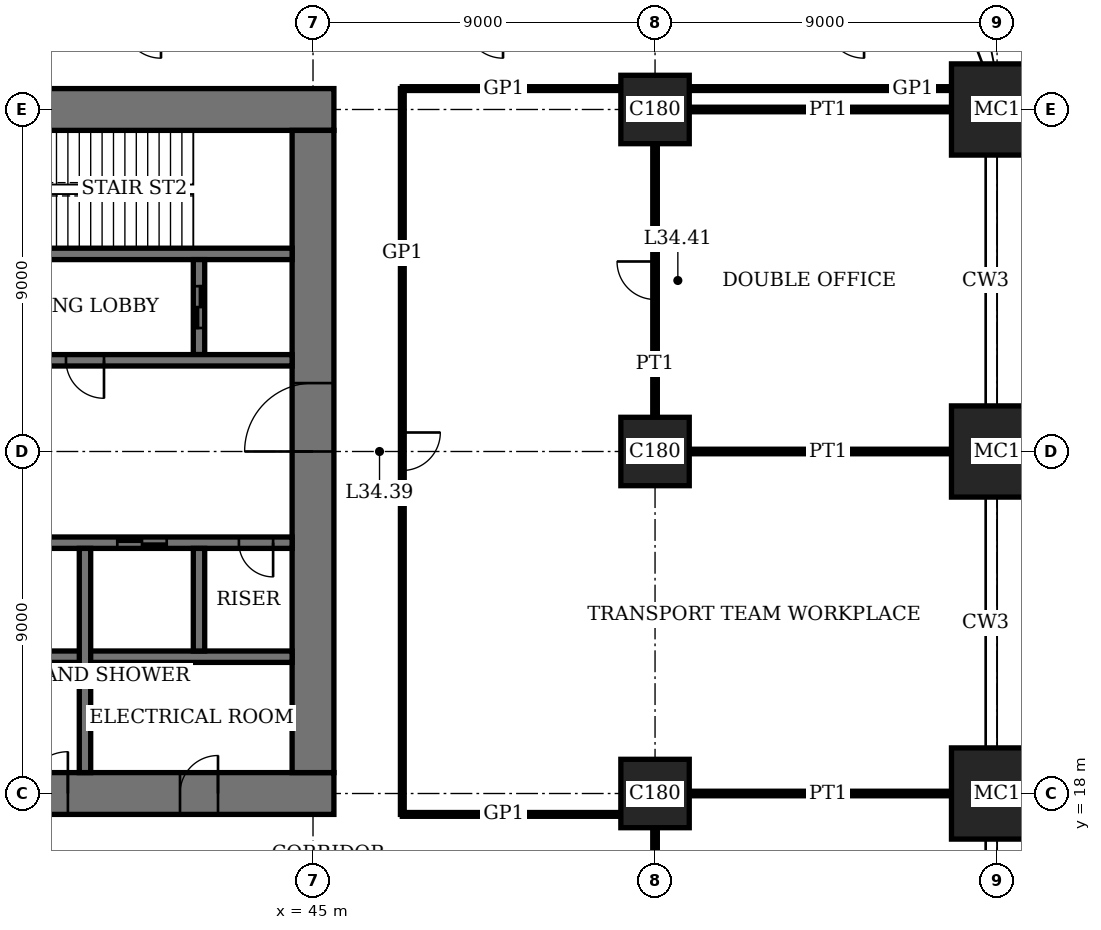
"""IFC4 building model, lengths in metres.
Left out: names, types, materials, properties, quantities, classifications, styles, units other than length and angle.
Written with IfcOpenShell. Run it as: python <this file> out.ifc"""

import sys

from ifc_helpers import new_model, si_unit, direction, frame, frame_2d, origin, origin_2d, place, context, subcontext, project, spatial, rectangle, extrude, element, fill, save


model = new_model("IFC4")
c1 = context("Model", 3, precision=1e-05, world=origin(), true_north=direction((0.0, 1.0)))
c2 = subcontext(c1, "Body", "Model", "MODEL_VIEW")
j1 = project(units=[si_unit("LENGTHUNIT", "METRE"), si_unit("PLANEANGLEUNIT", "RADIAN")], contexts=[c1])
p1 = place(None, origin())
s1 = spatial("IfcSite", under=j1, at=p1, CompositionType="ELEMENT")
p2 = place(p1, origin())
s2 = spatial("IfcBuilding", under=s1, at=p2, CompositionType="ELEMENT")
p3 = place(p2, frame((0.0, 0.0, 141.0)))
s3 = spatial("IfcBuildingStorey", under=s2, at=p3, CompositionType="ELEMENT", Elevation=141.0)
for number, where, z_axis, x_axis in (
    (1, (54.0, 18.0, 0.0), (0.0, 0.0, 1.0), (1.0, 0.0, 0.0)),
    (2, (54.0, 27.0, 0.0), (0.0, 0.0, 1.0), (1.0, 0.0, 0.0)),
    (3, (54.0, 36.0, 0.0), (0.0, 0.0, 1.0), (1.0, 0.0, 0.0)),
):
    element("IfcColumn", number, at=place(p3, frame(where, z_axis=z_axis, x_axis=x_axis)), inside=s3, PredefinedType="COLUMN", context=c2, shape_type="SweptSolid", body=[
        extrude(rectangle(XDim=1.8, YDim=1.8, at=origin_2d()), origin(), (0.0, 0.0, 1.0), 4.0),
    ])
for number, where, z_axis, x_axis in (
    (4, (63.0, 18.0, 0.0), (0.0, 0.0, 1.0), (1.0, 0.0, 0.0)),
    (5, (63.0, 27.0, 0.0), (0.0, 0.0, 1.0), (1.0, 0.0, 0.0)),
    (6, (63.0, 36.0, 0.0), (0.0, 0.0, 1.0), (1.0, 0.0, 0.0)),
):
    element("IfcColumn", number, at=place(p3, frame(where, z_axis=z_axis, x_axis=x_axis)), inside=s3, PredefinedType="COLUMN", context=c2, shape_type="SweptSolid", body=[
        extrude(rectangle(XDim=2.4, YDim=2.4, at=origin_2d()), origin(), (0.0, 0.0, 1.0), 4.0),
    ])
p4 = place(p3, frame((17.45, 18.0, 0.0), z_axis=(0.0, 0.0, 1.0), x_axis=(1.0, 0.0, 0.0)))
e7 = element("IfcWall", 7, at=p4, inside=s3, PredefinedType="SHEAR", context=c2, shape_type="SweptSolid", body=[
    extrude(rectangle(XDim=28.1, YDim=1.1, at=frame_2d((14.05, 0.0))), origin(), (0.0, 0.0, 1.0), 4.0),
])
p5 = place(p4, frame((11.55, 0.0, 0.0)))
e8 = element("IfcOpeningElement", 8, at=p5, cuts=e7, PredefinedType="OPENING", context=c2, shape_type="SweptSolid", body=[
    extrude(rectangle(XDim=1.0, YDim=2.4, at=frame_2d((0.5, 1.2))), frame((0.0, 0.56, 0.0), z_axis=(0.0, -1.0, 0.0), x_axis=(1.0, 0.0, 0.0)), (0.0, 0.0, 1.0), 1.12),
])
p6 = place(p4, frame((16.55, 0.0, 0.0)))
e9 = element("IfcOpeningElement", 9, at=p6, cuts=e7, PredefinedType="OPENING", context=c2, shape_type="SweptSolid", body=[
    extrude(rectangle(XDim=1.0, YDim=2.4, at=frame_2d((0.5, 1.2))), frame((0.0, 0.56, 0.0), z_axis=(0.0, -1.0, 0.0), x_axis=(1.0, 0.0, 0.0)), (0.0, 0.0, 1.0), 1.12),
])
p7 = place(p4, frame((20.0, 0.0, 0.0)))
e10 = element("IfcOpeningElement", 10, at=p7, cuts=e7, PredefinedType="OPENING", context=c2, shape_type="SweptSolid", body=[
    extrude(rectangle(XDim=1.1, YDim=2.4, at=frame_2d((0.55, 1.2))), frame((0.0, 0.56, 0.0), z_axis=(0.0, -1.0, 0.0), x_axis=(1.0, 0.0, 0.0)), (0.0, 0.0, 1.0), 1.12),
])
p8 = place(p4, frame((24.05, 0.0, 0.0)))
e11 = element("IfcOpeningElement", 11, at=p8, cuts=e7, PredefinedType="OPENING", context=c2, shape_type="SweptSolid", body=[
    extrude(rectangle(XDim=1.0, YDim=2.4, at=frame_2d((0.5, 1.2))), frame((0.0, 0.56, 0.0), z_axis=(0.0, -1.0, 0.0), x_axis=(1.0, 0.0, 0.0)), (0.0, 0.0, 1.0), 1.12),
])
p9 = place(p3, frame((45.55, 36.0, 0.0), z_axis=(0.0, 0.0, 1.0), x_axis=(-1.0, 0.0, 0.0)))
e12 = element("IfcWall", 12, at=p9, inside=s3, PredefinedType="SHEAR", context=c2, shape_type="SweptSolid", body=[
    extrude(rectangle(XDim=28.1, YDim=1.1, at=frame_2d((14.05, 0.0))), origin(), (0.0, 0.0, 1.0), 4.0),
])
p10 = place(p9, frame((11.55, 0.0, 0.0)))
e13 = element("IfcOpeningElement", 13, at=p10, cuts=e12, PredefinedType="OPENING", context=c2, shape_type="SweptSolid", body=[
    extrude(rectangle(XDim=1.0, YDim=2.4, at=frame_2d((0.5, 1.2))), frame((0.0, 0.56, 0.0), z_axis=(0.0, -1.0, 0.0), x_axis=(1.0, 0.0, 0.0)), (0.0, 0.0, 1.0), 1.12),
])
p11 = place(p9, frame((16.55, 0.0, 0.0)))
e14 = element("IfcOpeningElement", 14, at=p11, cuts=e12, PredefinedType="OPENING", context=c2, shape_type="SweptSolid", body=[
    extrude(rectangle(XDim=1.0, YDim=2.4, at=frame_2d((0.5, 1.2))), frame((0.0, 0.56, 0.0), z_axis=(0.0, -1.0, 0.0), x_axis=(1.0, 0.0, 0.0)), (0.0, 0.0, 1.0), 1.12),
])
p12 = place(p9, frame((20.0, 0.0, 0.0)))
e15 = element("IfcOpeningElement", 15, at=p12, cuts=e12, PredefinedType="OPENING", context=c2, shape_type="SweptSolid", body=[
    extrude(rectangle(XDim=1.1, YDim=2.4, at=frame_2d((0.55, 1.2))), frame((0.0, 0.56, 0.0), z_axis=(0.0, -1.0, 0.0), x_axis=(1.0, 0.0, 0.0)), (0.0, 0.0, 1.0), 1.12),
])
p13 = place(p9, frame((24.05, 0.0, 0.0)))
e16 = element("IfcOpeningElement", 16, at=p13, cuts=e12, PredefinedType="OPENING", context=c2, shape_type="SweptSolid", body=[
    extrude(rectangle(XDim=1.0, YDim=2.4, at=frame_2d((0.5, 1.2))), frame((0.0, 0.56, 0.0), z_axis=(0.0, -1.0, 0.0), x_axis=(1.0, 0.0, 0.0)), (0.0, 0.0, 1.0), 1.12),
])
p14 = place(p3, frame((45.0, 18.55, 0.0), z_axis=(0.0, 0.0, 1.0), x_axis=(0.0, 1.0, 0.0)))
e17 = element("IfcWall", 17, at=p14, inside=s3, PredefinedType="SHEAR", context=c2, shape_type="SweptSolid", body=[
    extrude(rectangle(XDim=16.9, YDim=1.1, at=frame_2d((8.45, 0.0))), origin(), (0.0, 0.0, 1.0), 4.0),
])
p15 = place(p14, frame((8.45, 0.0, 0.0)))
e18 = element("IfcOpeningElement", 18, at=p15, cuts=e17, PredefinedType="OPENING", context=c2, shape_type="SweptSolid", body=[
    extrude(rectangle(XDim=1.8, YDim=2.4, at=frame_2d((0.9, 1.2))), frame((0.0, 0.56, 0.0), z_axis=(0.0, -1.0, 0.0), x_axis=(1.0, 0.0, 0.0)), (0.0, 0.0, 1.0), 1.12),
])
p16 = place(p3, frame((36.15, 32.2, 0.0), z_axis=(0.0, 0.0, 1.0), x_axis=(1.0, 0.0, 0.0)))
e19 = element("IfcWall", 19, at=p16, inside=s3, PredefinedType="SHEAR", context=c2, shape_type="SweptSolid", body=[
    extrude(rectangle(XDim=8.3, YDim=0.3, at=frame_2d((4.15, 0.0))), origin(), (0.0, 0.0, 1.0), 4.0),
])
p17 = place(p16, frame((0.45, 0.0, 0.0)))
e20 = element("IfcOpeningElement", 20, at=p17, cuts=e19, PredefinedType="OPENING", context=c2, shape_type="SweptSolid", body=[
    extrude(rectangle(XDim=1.0, YDim=2.4, at=frame_2d((0.5, 1.2))), frame((0.0, 0.16, 0.0), z_axis=(0.0, -1.0, 0.0), x_axis=(1.0, 0.0, 0.0)), (0.0, 0.0, 1.0), 0.32),
])
p18 = place(p3, frame((42.0, 29.55, 0.0), z_axis=(0.0, 0.0, 1.0), x_axis=(0.0, 1.0, 0.0)))
e21 = element("IfcWall", 21, at=p18, inside=s3, PredefinedType="SHEAR", context=c2, shape_type="SweptSolid", body=[
    extrude(rectangle(XDim=2.5, YDim=0.3, at=frame_2d((1.25, 0.0))), origin(), (0.0, 0.0, 1.0), 4.0),
])
p19 = place(p18, frame((0.7, 0.0, 0.0)))
e22 = element("IfcOpeningElement", 22, at=p19, cuts=e21, PredefinedType="OPENING", context=c2, shape_type="SweptSolid", body=[
    extrude(rectangle(XDim=1.1, YDim=2.4, at=frame_2d((0.55, 1.2))), frame((0.0, 0.16, 0.0), z_axis=(0.0, -1.0, 0.0), x_axis=(1.0, 0.0, 0.0)), (0.0, 0.0, 1.0), 0.32),
])
p20 = place(p3, frame((18.55, 24.6, 0.0), z_axis=(0.0, 0.0, 1.0), x_axis=(1.0, 0.0, 0.0)))
e23 = element("IfcWall", 23, at=p20, inside=s3, PredefinedType="SHEAR", context=c2, shape_type="SweptSolid", body=[
    extrude(rectangle(XDim=25.9, YDim=0.3, at=frame_2d((12.95, 0.0))), origin(), (0.0, 0.0, 1.0), 4.0),
])
p21 = place(p20, frame((4.95, 0.0, 0.0)))
e24 = element("IfcOpeningElement", 24, at=p21, cuts=e23, PredefinedType="OPENING", context=c2, shape_type="SweptSolid", body=[
    extrude(rectangle(XDim=1.0, YDim=2.4, at=frame_2d((0.5, 1.2))), frame((0.0, 0.16, 0.0), z_axis=(0.0, -1.0, 0.0), x_axis=(1.0, 0.0, 0.0)), (0.0, 0.0, 1.0), 0.32),
])
p22 = place(p20, frame((24.5, 0.0, 0.0)))
e25 = element("IfcOpeningElement", 25, at=p22, cuts=e23, PredefinedType="OPENING", context=c2, shape_type="SweptSolid", body=[
    extrude(rectangle(XDim=0.9, YDim=2.1, at=frame_2d((0.45, 1.05))), frame((0.0, 0.16, 0.0), z_axis=(0.0, -1.0, 0.0), x_axis=(1.0, 0.0, 0.0)), (0.0, 0.0, 1.0), 0.32),
])
p23 = place(p20, frame((21.3, 0.0, 0.0)))
e26 = element("IfcOpeningElement", 26, at=p23, cuts=e23, PredefinedType="OPENING", context=c2, shape_type="SweptSolid", body=[
    extrude(rectangle(XDim=1.3, YDim=2.4, at=frame_2d((0.65, 1.2))), frame((0.0, 0.16, 0.0), z_axis=(0.0, -1.0, 0.0), x_axis=(1.0, 0.0, 0.0)), (0.0, 0.0, 1.0), 0.32),
])
p24 = place(p3, frame((18.55, 29.4, 0.0), z_axis=(0.0, 0.0, 1.0), x_axis=(1.0, 0.0, 0.0)))
e27 = element("IfcWall", 27, at=p24, inside=s3, PredefinedType="SHEAR", context=c2, shape_type="SweptSolid", body=[
    extrude(rectangle(XDim=25.9, YDim=0.3, at=frame_2d((12.95, 0.0))), origin(), (0.0, 0.0, 1.0), 4.0),
])
p25 = place(p24, frame((19.95, 0.0, 0.0)))
e28 = element("IfcOpeningElement", 28, at=p25, cuts=e27, PredefinedType="OPENING", context=c2, shape_type="SweptSolid", body=[
    extrude(rectangle(XDim=1.0, YDim=2.4, at=frame_2d((0.5, 1.2))), frame((0.0, 0.16, 0.0), z_axis=(0.0, -1.0, 0.0), x_axis=(1.0, 0.0, 0.0)), (0.0, 0.0, 1.0), 0.32),
])
p26 = place(p24, frame((0.5, 0.0, 0.0)))
e29 = element("IfcOpeningElement", 29, at=p26, cuts=e27, PredefinedType="OPENING", context=c2, shape_type="SweptSolid", body=[
    extrude(rectangle(XDim=0.9, YDim=2.1, at=frame_2d((0.45, 1.05))), frame((0.0, 0.16, 0.0), z_axis=(0.0, -1.0, 0.0), x_axis=(1.0, 0.0, 0.0)), (0.0, 0.0, 1.0), 0.32),
])
p27 = place(p24, frame((15.4, 0.0, 0.0)))
e30 = element("IfcOpeningElement", 30, at=p27, cuts=e27, PredefinedType="OPENING", context=c2, shape_type="SweptSolid", body=[
    extrude(rectangle(XDim=1.1, YDim=2.4, at=frame_2d((0.55, 1.2))), frame((0.0, 0.16, 0.0), z_axis=(0.0, -1.0, 0.0), x_axis=(1.0, 0.0, 0.0)), (0.0, 0.0, 1.0), 0.32),
])
p28 = place(p24, frame((12.4, 0.0, 0.0)))
e31 = element("IfcOpeningElement", 31, at=p28, cuts=e27, PredefinedType="OPENING", context=c2, shape_type="SweptSolid", body=[
    extrude(rectangle(XDim=1.1, YDim=2.4, at=frame_2d((0.55, 1.2))), frame((0.0, 0.16, 0.0), z_axis=(0.0, -1.0, 0.0), x_axis=(1.0, 0.0, 0.0)), (0.0, 0.0, 1.0), 0.32),
])
p29 = place(p24, frame((3.3, 0.0, 0.0)))
e32 = element("IfcOpeningElement", 32, at=p29, cuts=e27, PredefinedType="OPENING", context=c2, shape_type="SweptSolid", body=[
    extrude(rectangle(XDim=1.3, YDim=2.4, at=frame_2d((0.65, 1.2))), frame((0.0, 0.16, 0.0), z_axis=(0.0, -1.0, 0.0), x_axis=(1.0, 0.0, 0.0)), (0.0, 0.0, 1.0), 0.32),
])
p30 = place(p3, frame((27.15, 21.6, 0.0), z_axis=(0.0, 0.0, 1.0), x_axis=(1.0, 0.0, 0.0)))
e33 = element("IfcWall", 33, at=p30, inside=s3, PredefinedType="SHEAR", context=c2, shape_type="SweptSolid", body=[
    extrude(rectangle(XDim=17.3, YDim=0.3, at=frame_2d((8.65, 0.0))), origin(), (0.0, 0.0, 1.0), 4.0),
])
p31 = place(p3, frame((39.0, 18.55, 0.0), z_axis=(0.0, 0.0, 1.0), x_axis=(0.0, 1.0, 0.0)))
e34 = element("IfcWall", 34, at=p31, inside=s3, PredefinedType="SHEAR", context=c2, shape_type="SweptSolid", body=[
    extrude(rectangle(XDim=5.9, YDim=0.3, at=frame_2d((2.95, 0.0))), origin(), (0.0, 0.0, 1.0), 4.0),
])
p32 = place(p3, frame((42.0, 21.75, 0.0), z_axis=(0.0, 0.0, 1.0), x_axis=(0.0, 1.0, 0.0)))
e35 = element("IfcWall", 35, at=p32, inside=s3, PredefinedType="SHEAR", context=c2, shape_type="SweptSolid", body=[
    extrude(rectangle(XDim=2.7, YDim=0.3, at=frame_2d((1.35, 0.0))), origin(), (0.0, 0.0, 1.0), 4.0),
])
p33 = place(p3, frame((47.35, 17.45, 0.0), z_axis=(0.0, 0.0, 1.0), x_axis=(1.0, 0.0, 0.0)))
e36 = element("IfcWall", 36, at=p33, inside=s3, PredefinedType="PARTITIONING", context=c2, shape_type="SweptSolid", body=[
    extrude(rectangle(XDim=5.75, YDim=0.1, at=frame_2d((2.875, 0.0))), origin(), (0.0, 0.0, 1.0), 3.05),
])
for number, where, z_axis, x_axis in (
    (37, (54.9, 18.0, 0.0), (0.0, 0.0, 1.0), (1.0, 0.0, 0.0)),
    (38, (54.9, 27.0, 0.0), (0.0, 0.0, 1.0), (1.0, 0.0, 0.0)),
    (39, (54.9, 36.0, 0.0), (0.0, 0.0, 1.0), (1.0, 0.0, 0.0)),
):
    element("IfcWall", number, at=place(p3, frame(where, z_axis=z_axis, x_axis=x_axis)), inside=s3, PredefinedType="PARTITIONING", context=c2, shape_type="SweptSolid", body=[
        extrude(rectangle(XDim=6.9, YDim=0.12, at=frame_2d((3.45, 0.0))), origin(), (0.0, 0.0, 1.0), 3.05),
    ])
p34 = place(p3, frame((47.35, 36.55, 0.0), z_axis=(0.0, 0.0, 1.0), x_axis=(1.0, 0.0, 0.0)))
e40 = element("IfcWall", 40, at=p34, inside=s3, PredefinedType="PARTITIONING", context=c2, shape_type="SweptSolid", body=[
    extrude(rectangle(XDim=5.75, YDim=0.1, at=frame_2d((2.875, 0.0))), origin(), (0.0, 0.0, 1.0), 3.05),
])
p35 = place(p3, frame((54.9, 36.55, 0.0), z_axis=(0.0, 0.0, 1.0), x_axis=(1.0, 0.0, 0.0)))
e41 = element("IfcWall", 41, at=p35, inside=s3, PredefinedType="PARTITIONING", context=c2, shape_type="SweptSolid", body=[
    extrude(rectangle(XDim=6.9, YDim=0.1, at=frame_2d((3.45, 0.0))), origin(), (0.0, 0.0, 1.0), 3.05),
])
p36 = place(p3, frame((47.35, 17.45, 0.0), z_axis=(0.0, 0.0, 1.0), x_axis=(0.0, 1.0, 0.0)))
e42 = element("IfcWall", 42, at=p36, inside=s3, PredefinedType="PARTITIONING", context=c2, shape_type="SweptSolid", body=[
    extrude(rectangle(XDim=19.1, YDim=0.1, at=frame_2d((9.55, 0.0))), origin(), (0.0, 0.0, 1.0), 3.75),
])
p37 = place(p36, frame((9.05, 0.0, 0.0)))
e43 = element("IfcOpeningElement", 43, at=p37, cuts=e42, PredefinedType="OPENING", context=c2, shape_type="SweptSolid", body=[
    extrude(rectangle(XDim=1.0, YDim=2.4, at=frame_2d((0.5, 1.2))), frame((0.0, 0.06, 0.0), z_axis=(0.0, -1.0, 0.0), x_axis=(1.0, 0.0, 0.0)), (0.0, 0.0, 1.0), 0.12),
])
p38 = place(p3, frame((54.0, 9.9, 0.0), z_axis=(0.0, 0.0, 1.0), x_axis=(0.0, 1.0, 0.0)))
e44 = element("IfcWall", 44, at=p38, inside=s3, PredefinedType="PARTITIONING", context=c2, shape_type="SweptSolid", body=[
    extrude(rectangle(XDim=7.2, YDim=0.12, at=frame_2d((3.6, 0.0))), origin(), (0.0, 0.0, 1.0), 3.05),
])
p39 = place(p38, frame((3.1, 0.0, 0.0)))
e45 = element("IfcOpeningElement", 45, at=p39, cuts=e44, PredefinedType="OPENING", context=c2, shape_type="SweptSolid", body=[
    extrude(rectangle(XDim=1.0, YDim=2.4, at=frame_2d((0.5, 1.2))), frame((0.0, 0.07, 0.0), z_axis=(0.0, -1.0, 0.0), x_axis=(1.0, 0.0, 0.0)), (0.0, 0.0, 1.0), 0.14),
])
p40 = place(p3, frame((54.0, 27.9, 0.0), z_axis=(0.0, 0.0, 1.0), x_axis=(0.0, 1.0, 0.0)))
e46 = element("IfcWall", 46, at=p40, inside=s3, PredefinedType="PARTITIONING", context=c2, shape_type="SweptSolid", body=[
    extrude(rectangle(XDim=7.2, YDim=0.12, at=frame_2d((3.6, 0.0))), origin(), (0.0, 0.0, 1.0), 3.05),
])
p41 = place(p40, frame((3.1, 0.0, 0.0)))
e47 = element("IfcOpeningElement", 47, at=p41, cuts=e46, PredefinedType="OPENING", context=c2, shape_type="SweptSolid", body=[
    extrude(rectangle(XDim=1.0, YDim=2.4, at=frame_2d((0.5, 1.2))), frame((0.0, 0.07, 0.0), z_axis=(0.0, -1.0, 0.0), x_axis=(1.0, 0.0, 0.0)), (0.0, 0.0, 1.0), 0.14),
])
p42 = place(p15, origin())
e48 = element("IfcDoor", 48, at=p42, inside=s3, OperationType="DOUBLE_DOOR_DOUBLE_SWING", PredefinedType="DOOR", context=c2, shape_type="SweptSolid", body=[
    extrude(rectangle(XDim=1.8, YDim=2.4, at=frame_2d((0.9, 1.2))), frame((0.0, 0.03, 0.0), z_axis=(0.0, -1.0, 0.0), x_axis=(1.0, 0.0, 0.0)), (0.0, 0.0, 1.0), 0.06),
    extrude(rectangle(XDim=0.04, YDim=2.4, at=frame_2d((0.02, 1.2))), frame((0.0, 0.55, 0.0), z_axis=(0.0, -1.0, 0.0), x_axis=(1.0, 0.0, 0.0)), (0.0, 0.0, 1.0), 1.1),
    extrude(rectangle(XDim=0.04, YDim=2.4, at=frame_2d((1.78, 1.2))), frame((0.0, 0.55, 0.0), z_axis=(0.0, -1.0, 0.0), x_axis=(1.0, 0.0, 0.0)), (0.0, 0.0, 1.0), 1.1),
    extrude(rectangle(XDim=1.8, YDim=0.04, at=frame_2d((0.9, 2.38))), frame((0.0, 0.55, 0.0), z_axis=(0.0, -1.0, 0.0), x_axis=(1.0, 0.0, 0.0)), (0.0, 0.0, 1.0), 1.1),
])
fill(e18, e48)
p43 = place(p7, origin())
e49 = element("IfcDoor", 49, at=p43, inside=s3, OperationType="SINGLE_SWING_LEFT", PredefinedType="DOOR", context=c2, shape_type="SweptSolid", body=[
    extrude(rectangle(XDim=1.1, YDim=2.4, at=frame_2d((0.55, 1.2))), frame((0.0, 0.025, 0.0), z_axis=(0.0, -1.0, 0.0), x_axis=(1.0, 0.0, 0.0)), (0.0, 0.0, 1.0), 0.05),
    extrude(rectangle(XDim=0.04, YDim=2.4, at=frame_2d((0.02, 1.2))), frame((0.0, 0.44, 0.0), z_axis=(0.0, -1.0, 0.0), x_axis=(1.0, 0.0, 0.0)), (0.0, 0.0, 1.0), 0.88),
    extrude(rectangle(XDim=0.04, YDim=2.4, at=frame_2d((1.08, 1.2))), frame((0.0, 0.44, 0.0), z_axis=(0.0, -1.0, 0.0), x_axis=(1.0, 0.0, 0.0)), (0.0, 0.0, 1.0), 0.88),
    extrude(rectangle(XDim=1.1, YDim=0.04, at=frame_2d((0.55, 2.38))), frame((0.0, 0.44, 0.0), z_axis=(0.0, -1.0, 0.0), x_axis=(1.0, 0.0, 0.0)), (0.0, 0.0, 1.0), 0.88),
])
fill(e10, e49)
p44 = place(p8, origin())
e50 = element("IfcDoor", 50, at=p44, inside=s3, OperationType="SINGLE_SWING_LEFT", PredefinedType="DOOR", context=c2, shape_type="SweptSolid", body=[
    extrude(rectangle(XDim=1.0, YDim=2.4, at=frame_2d((0.5, 1.2))), frame((0.0, 0.025, 0.0), z_axis=(0.0, -1.0, 0.0), x_axis=(1.0, 0.0, 0.0)), (0.0, 0.0, 1.0), 0.05),
    extrude(rectangle(XDim=0.04, YDim=2.4, at=frame_2d((0.02, 1.2))), frame((0.0, 0.4, 0.0), z_axis=(0.0, -1.0, 0.0), x_axis=(1.0, 0.0, 0.0)), (0.0, 0.0, 1.0), 0.8),
    extrude(rectangle(XDim=0.04, YDim=2.4, at=frame_2d((0.98, 1.2))), frame((0.0, 0.4, 0.0), z_axis=(0.0, -1.0, 0.0), x_axis=(1.0, 0.0, 0.0)), (0.0, 0.0, 1.0), 0.8),
    extrude(rectangle(XDim=1.0, YDim=0.04, at=frame_2d((0.5, 2.38))), frame((0.0, 0.4, 0.0), z_axis=(0.0, -1.0, 0.0), x_axis=(1.0, 0.0, 0.0)), (0.0, 0.0, 1.0), 0.8),
])
fill(e11, e50)
p45 = place(p25, origin())
e51 = element("IfcDoor", 51, at=p45, inside=s3, OperationType="SINGLE_SWING_RIGHT", PredefinedType="DOOR", context=c2, shape_type="SweptSolid", body=[
    extrude(rectangle(XDim=1.0, YDim=2.4, at=frame_2d((0.5, 1.2))), frame((0.0, 0.03, 0.0), z_axis=(0.0, -1.0, 0.0), x_axis=(1.0, 0.0, 0.0)), (0.0, 0.0, 1.0), 0.06),
])
fill(e28, e51)
p46 = place(p22, origin())
e52 = element("IfcDoor", 52, at=p46, inside=s3, OperationType="SINGLE_SWING_RIGHT", PredefinedType="DOOR", context=c2, shape_type="SweptSolid", body=[
    extrude(rectangle(XDim=0.9, YDim=2.1, at=frame_2d((0.45, 1.05))), frame((0.0, 0.03, 0.0), z_axis=(0.0, -1.0, 0.0), x_axis=(1.0, 0.0, 0.0)), (0.0, 0.0, 1.0), 0.06),
])
fill(e25, e52)
p47 = place(p37, origin())
e53 = element("IfcDoor", 53, at=p47, inside=s3, OperationType="SINGLE_SWING_RIGHT", PredefinedType="DOOR", context=c2, shape_type="SweptSolid", body=[
    extrude(rectangle(XDim=1.0, YDim=2.4, at=frame_2d((0.5, 1.2))), frame((0.0, 0.02, 0.0), z_axis=(0.0, -1.0, 0.0), x_axis=(1.0, 0.0, 0.0)), (0.0, 0.0, 1.0), 0.04),
])
fill(e43, e53)
p48 = place(p41, origin())
e54 = element("IfcDoor", 54, at=p48, inside=s3, OperationType="SINGLE_SWING_LEFT", PredefinedType="DOOR", context=c2, shape_type="SweptSolid", body=[
    extrude(rectangle(XDim=1.0, YDim=2.4, at=frame_2d((0.5, 1.2))), frame((0.0, 0.025, 0.0), z_axis=(0.0, -1.0, 0.0), x_axis=(1.0, 0.0, 0.0)), (0.0, 0.0, 1.0), 0.05),
])
fill(e47, e54)
p49 = place(p23, origin())
e55 = element("IfcDoor", 55, at=p49, inside=s3, OperationType="DOUBLE_DOOR_SLIDING", PredefinedType="DOOR", context=c2, shape_type="SweptSolid", body=[
    extrude(rectangle(XDim=1.3, YDim=2.4, at=frame_2d((0.65, 1.2))), frame((0.0, 0.02, 0.0), z_axis=(0.0, -1.0, 0.0), x_axis=(1.0, 0.0, 0.0)), (0.0, 0.0, 1.0), 0.04),
])
fill(e26, e55)
p50 = place(p19, origin())
e56 = element("IfcDoor", 56, at=p50, inside=s3, OperationType="DOUBLE_DOOR_SLIDING", PredefinedType="DOOR", context=c2, shape_type="SweptSolid", body=[
    extrude(rectangle(XDim=1.1, YDim=2.4, at=frame_2d((0.55, 1.2))), frame((0.0, 0.03, 0.0), z_axis=(0.0, -1.0, 0.0), x_axis=(1.0, 0.0, 0.0)), (0.0, 0.0, 1.0), 0.06),
])
fill(e22, e56)
save(model, sys.argv[1])
